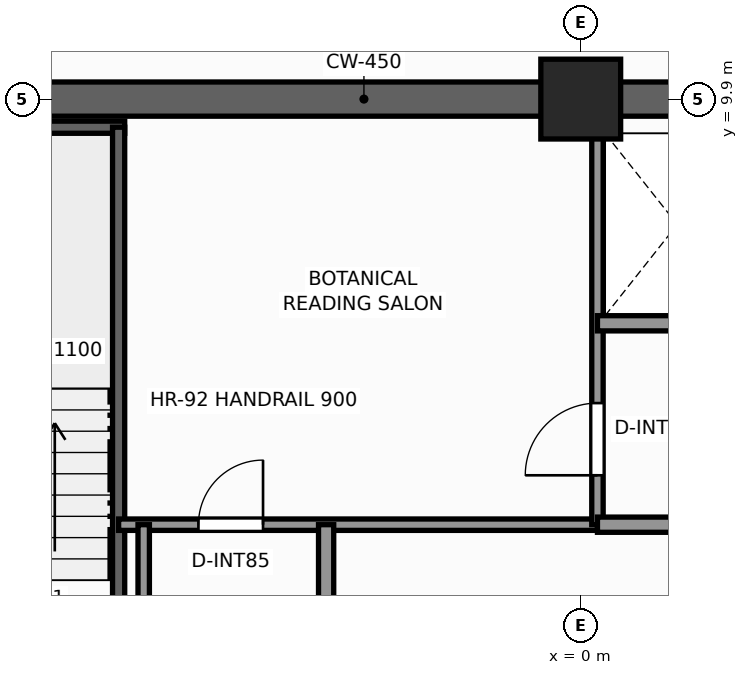
"""IFC4 building model, lengths in metres.
Left out: names, types, materials, properties, quantities, classifications, styles, units other than length and angle.
Written with IfcOpenShell. Run it as: python <this file> out.ifc"""

import sys

from ifc_helpers import new_model, si_unit, direction, frame, frame_2d, origin, origin_2d, place, context, subcontext, project, spatial, rectangle, extrude, element, fill, save


model = new_model("IFC4")
c1 = context("Model", 3, precision=1e-05, world=origin(), true_north=direction((0.0, 1.0)))
c2 = subcontext(c1, "Body", "Model", "MODEL_VIEW")
j1 = project(units=[si_unit("LENGTHUNIT", "METRE"), si_unit("PLANEANGLEUNIT", "RADIAN")], contexts=[c1])
p1 = place(None, origin())
s1 = spatial("IfcSite", under=j1, at=p1, CompositionType="ELEMENT")
p2 = place(p1, origin())
s2 = spatial("IfcBuilding", under=s1, at=p2, CompositionType="ELEMENT")
p3 = place(p2, frame((0.0, 0.0, 216.3)))
s3 = spatial("IfcBuildingStorey", under=s2, at=p3, CompositionType="ELEMENT", Elevation=216.3)
p4 = place(p3, frame((-10.125, 9.9, 0.0), z_axis=(0.0, 0.0, 1.0), x_axis=(1.0, 0.0, 0.0)))
e1 = element("IfcWall", 1, at=p4, inside=s3, PredefinedType="SHEAR", context=c2, shape_type="SweptSolid", body=[
    extrude(rectangle(XDim=14.545, YDim=0.45, at=frame_2d((7.272, 0.0))), origin(), (0.0, 0.0, 1.0), 3.3),
])
p5 = place(p3, frame((0.0, 9.9, 0.0), z_axis=(0.0, 0.0, 1.0), x_axis=(1.0, 0.0, 0.0)))
e2 = element("IfcColumn", 2, at=p5, inside=s3, PredefinedType="COLUMN", context=c2, shape_type="SweptSolid", body=[
    extrude(rectangle(XDim=1.05, YDim=1.05, at=origin_2d()), origin(), (0.0, 0.0, 1.0), 3.3),
])
p6 = place(p3, frame((-9.52, 9.53, 0.0), z_axis=(0.0, 0.0, 1.0), x_axis=(1.0, 0.0, 0.0)))
e3 = element("IfcWall", 3, at=p6, inside=s3, PredefinedType="SHEAR", context=c2, shape_type="SweptSolid", body=[
    extrude(rectangle(XDim=3.52, YDim=0.16, at=frame_2d((1.76, 0.0))), origin(), (0.0, 0.0, 1.0), 3.3),
])
p7 = place(p3, frame((-6.08, 1.97, 0.0), z_axis=(0.0, 0.0, 1.0), x_axis=(0.0, 1.0, 0.0)))
e4 = element("IfcWall", 4, at=p7, inside=s3, PredefinedType="SHEAR", context=c2, shape_type="SweptSolid", body=[
    extrude(rectangle(XDim=7.56, YDim=0.16, at=frame_2d((3.78, 0.0))), origin(), (0.0, 0.0, 1.0), 3.3),
])
p8 = place(p3, frame((-6.08, 4.3, 0.0), z_axis=(0.0, 0.0, 1.0), x_axis=(1.0, 0.0, 0.0)))
e5 = element("IfcWall", 5, at=p8, inside=s3, PredefinedType="PARTITIONING", context=c2, shape_type="SweptSolid", body=[
    extrude(rectangle(XDim=6.3, YDim=0.15, at=frame_2d((3.15, 0.0))), origin(), (0.0, 0.0, 1.0), 3.08),
])
p9 = place(p8, frame((1.05, 0.0, 0.0)))
e6 = element("IfcOpeningElement", 6, at=p9, cuts=e5, PredefinedType="OPENING", context=c2, shape_type="SweptSolid", body=[
    extrude(rectangle(XDim=0.85, YDim=2.03, at=frame_2d((0.425, 1.015))), frame((0.0, 0.085, 0.0), z_axis=(0.0, -1.0, 0.0), x_axis=(1.0, 0.0, 0.0)), (0.0, 0.0, 1.0), 0.17),
])
p10 = place(p3, frame((0.22, 4.3, 0.0), z_axis=(0.0, 0.0, 1.0), x_axis=(0.0, 1.0, 0.0)))
e7 = element("IfcWall", 7, at=p10, inside=s3, PredefinedType="PARTITIONING", context=c2, shape_type="SweptSolid", body=[
    extrude(rectangle(XDim=5.22, YDim=0.15, at=frame_2d((2.61, 0.0))), origin(), (0.0, 0.0, 1.0), 3.08),
])
p11 = place(p10, frame((0.65, 0.0, 0.0)))
e8 = element("IfcOpeningElement", 8, at=p11, cuts=e7, PredefinedType="OPENING", context=c2, shape_type="SweptSolid", body=[
    extrude(rectangle(XDim=0.95, YDim=2.06, at=frame_2d((0.475, 1.03))), frame((0.0, 0.085, 0.0), z_axis=(0.0, -1.0, 0.0), x_axis=(1.0, 0.0, 0.0)), (0.0, 0.0, 1.0), 0.17),
])
p12 = place(p3, frame((0.22, 6.95, 0.0), z_axis=(0.0, 0.0, 1.0), x_axis=(1.0, 0.0, 0.0)))
e9 = element("IfcWall", 9, at=p12, inside=s3, PredefinedType="SOLIDWALL", context=c2, shape_type="SweptSolid", body=[
    extrude(rectangle(XDim=4.18, YDim=0.2, at=frame_2d((2.09, 0.0))), origin(), (0.0, 0.0, 1.0), 3.08),
])
p13 = place(p3, frame((0.22, 4.3, 0.0), z_axis=(0.0, 0.0, 1.0), x_axis=(1.0, 0.0, 0.0)))
e10 = element("IfcWall", 10, at=p13, inside=s3, PredefinedType="SOLIDWALL", context=c2, shape_type="SweptSolid", body=[
    extrude(rectangle(XDim=3.13, YDim=0.2, at=frame_2d((1.565, 0.0))), origin(), (0.0, 0.0, 1.0), 3.08),
])
p14 = place(p13, frame((1.05, 0.0, 0.0)))
e11 = element("IfcOpeningElement", 11, at=p14, cuts=e10, PredefinedType="OPENING", context=c2, shape_type="SweptSolid", body=[
    extrude(rectangle(XDim=0.95, YDim=2.06, at=frame_2d((0.475, 1.03))), frame((0.0, 0.11, 0.0), z_axis=(0.0, -1.0, 0.0), x_axis=(1.0, 0.0, 0.0)), (0.0, 0.0, 1.0), 0.22),
])
p15 = place(p3, frame((-3.35, 1.1, 0.0), z_axis=(0.0, 0.0, 1.0), x_axis=(0.0, 1.0, 0.0)))
e12 = element("IfcWall", 12, at=p15, inside=s3, PredefinedType="SOLIDWALL", context=c2, shape_type="SweptSolid", body=[
    extrude(rectangle(XDim=3.2, YDim=0.2, at=frame_2d((1.6, 0.0))), origin(), (0.0, 0.0, 1.0), 3.08),
])
p16 = place(p3, frame((-5.75, 1.97, 0.0), z_axis=(0.0, 0.0, 1.0), x_axis=(0.0, 1.0, 0.0)))
e13 = element("IfcWall", 13, at=p16, inside=s3, PredefinedType="PARTITIONING", context=c2, shape_type="SweptSolid", body=[
    extrude(rectangle(XDim=2.33, YDim=0.15, at=frame_2d((1.165, 0.0))), origin(), (0.0, 0.0, 1.0), 3.08),
])
p17 = place(p11, origin())
e14 = element("IfcDoor", 14, at=p17, inside=s3, OperationType="SINGLE_SWING_LEFT", PredefinedType="DOOR", context=c2, shape_type="SweptSolid", body=[
    extrude(rectangle(XDim=0.95, YDim=2.06, at=frame_2d((0.475, 1.03))), frame((0.0, 0.025, 0.0), z_axis=(0.0, -1.0, 0.0), x_axis=(1.0, 0.0, 0.0)), (0.0, 0.0, 1.0), 0.05),
])
fill(e8, e14)
p18 = place(p9, origin())
e15 = element("IfcDoor", 15, at=p18, inside=s3, OperationType="SINGLE_SWING_RIGHT", PredefinedType="DOOR", context=c2, shape_type="SweptSolid", body=[
    extrude(rectangle(XDim=0.85, YDim=2.03, at=frame_2d((0.425, 1.015))), frame((0.0, 0.025, 0.0), z_axis=(0.0, -1.0, 0.0), x_axis=(1.0, 0.0, 0.0)), (0.0, 0.0, 1.0), 0.05),
])
fill(e6, e15)
save(model, sys.argv[1])
